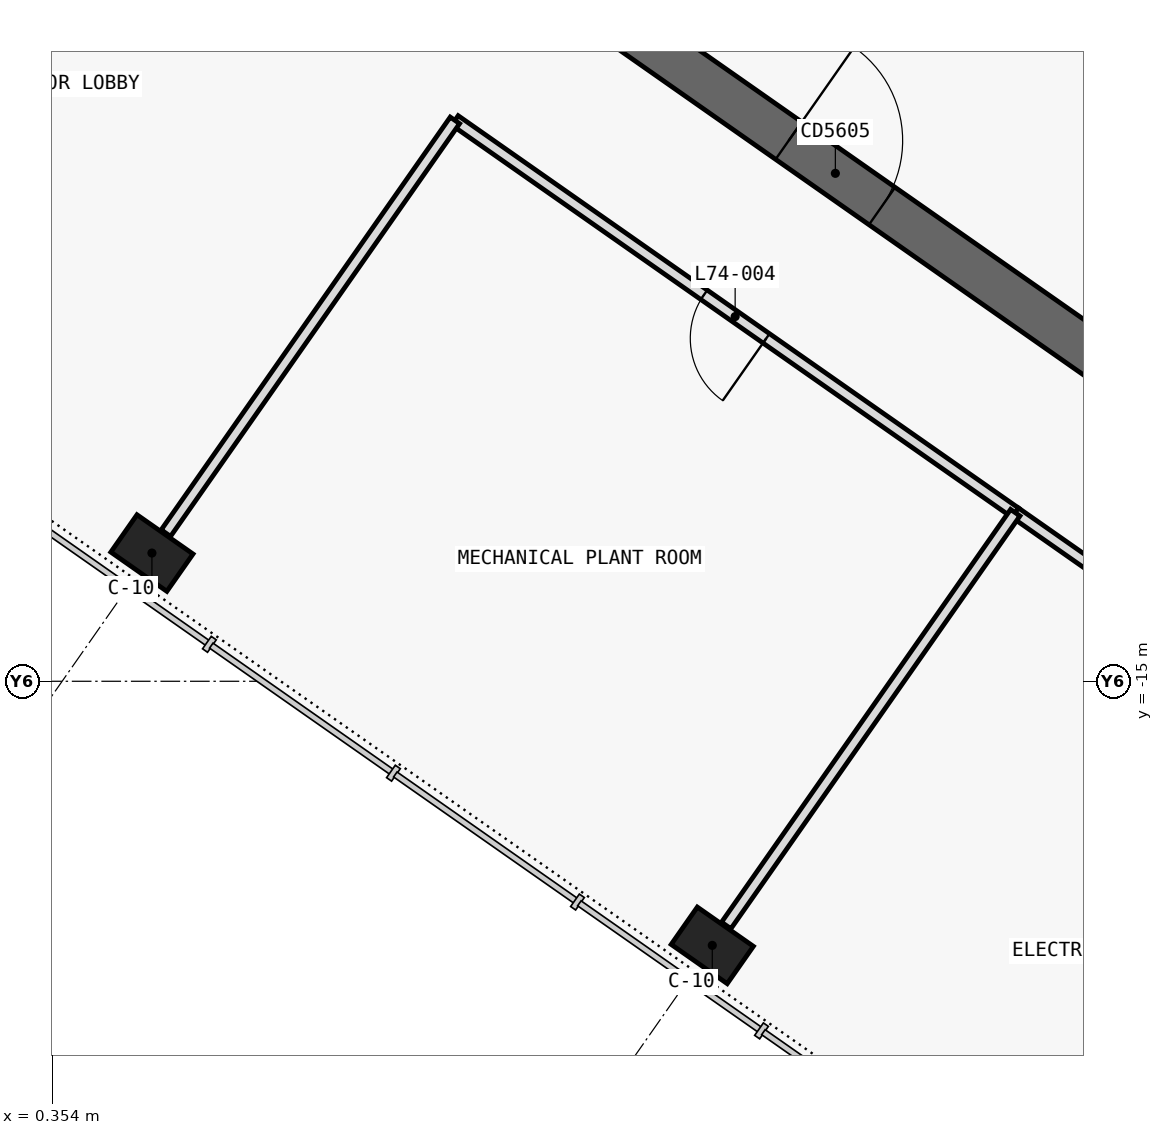
"""IFC4 building model, lengths in metres.
Left out: names, types, materials, properties, quantities, classifications, styles, units other than length and angle.
Written with IfcOpenShell. Run it as: python <this file> out.ifc"""

import sys

from ifc_helpers import new_model, si_unit, direction, frame, frame_2d, origin, origin_2d, place, context, subcontext, project, spatial, polyline, rectangle, outline, extrude, element, fill, save


model = new_model("IFC4")
c1 = context("Model", 3, precision=1e-05, world=origin(), true_north=direction((0.0, 1.0)))
c2 = subcontext(c1, "Body", "Model", "MODEL_VIEW")
j1 = project(units=[si_unit("LENGTHUNIT", "METRE"), si_unit("PLANEANGLEUNIT", "RADIAN")], contexts=[c1])
p1 = place(None, origin())
s1 = spatial("IfcSite", under=j1, at=p1, CompositionType="ELEMENT")
p2 = place(p1, origin())
s2 = spatial("IfcBuilding", under=s1, at=p2, CompositionType="ELEMENT")
p3 = place(p2, frame((0.0, 0.0, 313.3)))
s3 = spatial("IfcBuildingStorey", under=s2, at=p3, CompositionType="ELEMENT", Elevation=313.3)
p4 = place(p3, frame((0.028, 12.066, 0.0), z_axis=(0.0, 0.0, 1.0), x_axis=(0.819151382952, -0.573577380837, 0.0)))
e1 = element("IfcWall", 1, at=p4, inside=s3, PredefinedType="SHEAR", context=c2, shape_type="SweptSolid", body=[
    extrude(outline(polyline([(33.898, 0.3), (0.0, 0.3), (0.42, -0.3), (33.898, -0.3), (33.898, 0.3)])), origin(), (0.0, 0.0, 1.0), 5.5),
])
p5 = place(p3, frame((0.028, -0.874, 0.0), z_axis=(0.0, 0.0, 1.0), x_axis=(0.819150035022, -0.573579305871, 0.0)))
e2 = element("IfcWall", 2, at=p5, inside=s3, PredefinedType="SHEAR", context=c2, shape_type="SweptSolid", body=[
    extrude(outline(polyline([(26.476, 0.3), (0.0, 0.3), (0.42, -0.3), (26.476, -0.3), (26.476, 0.3)])), origin(), (0.0, 0.0, 1.0), 5.5),
])
p6 = place(p5, frame((6.576, 0.0, 0.0)))
e3 = element("IfcOpeningElement", 3, at=p6, cuts=e2, PredefinedType="OPENING", context=c2, shape_type="SweptSolid", body=[
    extrude(rectangle(XDim=1.5, YDim=2.1, at=frame_2d((0.75, 1.05))), frame((0.0, 0.31, 0.0), z_axis=(0.0, -1.0, 0.0), x_axis=(1.0, 0.0, 0.0)), (0.0, 0.0, 1.0), 0.62),
])
p7 = place(p5, frame((12.226, 0.0, 0.0)))
e4 = element("IfcOpeningElement", 4, at=p7, cuts=e2, PredefinedType="OPENING", context=c2, shape_type="SweptSolid", body=[
    extrude(rectangle(XDim=1.5, YDim=2.1, at=frame_2d((0.75, 1.05))), frame((0.0, 0.31, 0.0), z_axis=(0.0, -1.0, 0.0), x_axis=(1.0, 0.0, 0.0)), (0.0, 0.0, 1.0), 0.62),
])
p8 = place(p3, frame((2.638, 3.768, 0.0), z_axis=(0.0, 0.0, 1.0), x_axis=(0.819155014212, -0.573572194837, 0.0)))
e5 = element("IfcWall", 5, at=p8, inside=s3, PredefinedType="SHEAR", context=c2, shape_type="SweptSolid", body=[
    extrude(outline(polyline([(0.0, 0.15), (0.0, -0.15), (26.4, -0.15), (26.4, 0.15), (0.0, 0.15)])), origin(), (0.0, 0.0, 1.0), 5.5),
])
p9 = place(p8, frame((9.637, 0.0, 0.0)))
e6 = element("IfcOpeningElement", 6, at=p9, cuts=e5, PredefinedType="OPENING", context=c2, shape_type="SweptSolid", body=[
    extrude(rectangle(XDim=1.2, YDim=2.1, at=frame_2d((0.6, 1.05))), frame((0.0, 0.16, 0.0), z_axis=(0.0, -1.0, 0.0), x_axis=(1.0, 0.0, 0.0)), (0.0, 0.0, 1.0), 0.32),
])
p10 = place(p8, frame((11.812, 0.0, 0.0)))
e7 = element("IfcOpeningElement", 7, at=p10, cuts=e5, PredefinedType="OPENING", context=c2, shape_type="SweptSolid", body=[
    extrude(rectangle(XDim=1.2, YDim=2.1, at=frame_2d((0.6, 1.05))), frame((0.0, 0.16, 0.0), z_axis=(0.0, -1.0, 0.0), x_axis=(1.0, 0.0, 0.0)), (0.0, 0.0, 1.0), 0.32),
])
p11 = place(p8, frame((13.988, 0.0, 0.0)))
e8 = element("IfcOpeningElement", 8, at=p11, cuts=e5, PredefinedType="OPENING", context=c2, shape_type="SweptSolid", body=[
    extrude(rectangle(XDim=1.2, YDim=2.1, at=frame_2d((0.6, 1.05))), frame((0.0, 0.16, 0.0), z_axis=(0.0, -1.0, 0.0), x_axis=(1.0, 0.0, 0.0)), (0.0, 0.0, 1.0), 0.32),
])
p12 = place(p8, frame((16.262, 0.0, 0.0)))
e9 = element("IfcOpeningElement", 9, at=p12, cuts=e5, PredefinedType="OPENING", context=c2, shape_type="SweptSolid", body=[
    extrude(rectangle(XDim=1.0, YDim=2.1, at=frame_2d((0.5, 1.05))), frame((0.0, 0.16, 0.0), z_axis=(0.0, -1.0, 0.0), x_axis=(1.0, 0.0, 0.0)), (0.0, 0.0, 1.0), 0.32),
])
for number, where, z_axis, x_axis in (
    (10, (1.665, -13.313, 0.0), (0.0, 0.0, 1.0), (0.819, -0.574, 0.0)),
    (11, (9.038, -18.475, 0.0), (0.0, 0.0, 1.0), (0.819, -0.574, 0.0)),
):
    element("IfcColumn", number, at=place(p3, frame(where, z_axis=z_axis, x_axis=x_axis)), inside=s3, PredefinedType="COLUMN", context=c2, shape_type="SweptSolid", body=[
        extrude(rectangle(XDim=0.9, YDim=0.6, at=origin_2d()), origin(), (0.0, 0.0, 1.0), 5.5),
    ])
p13 = place(p3, frame((13.026, -12.783, 0.0), z_axis=(0.0, 0.0, 1.0), x_axis=(-0.81915291695, 0.57357519006, 0.0)))
e12 = element("IfcWall", 12, at=p13, inside=s3, PredefinedType="PARTITIONING", context=c2, shape_type="SweptSolid", body=[
    extrude(rectangle(XDim=9.002, YDim=0.15, at=frame_2d((4.501, 0.0))), origin(), (0.0, 0.0, 1.0), 5.2),
])
p14 = place(p13, frame((4.001, 0.0, 0.0)))
e13 = element("IfcOpeningElement", 13, at=p14, cuts=e12, PredefinedType="OPENING", context=c2, shape_type="SweptSolid", body=[
    extrude(rectangle(XDim=1.0, YDim=2.1, at=frame_2d((0.5, 1.05))), frame((0.0, 0.085, 0.0), z_axis=(0.0, -1.0, 0.0), x_axis=(1.0, 0.0, 0.0)), (0.0, 0.0, 1.0), 0.17),
])
p15 = place(p3, frame((20.398, -17.945, 0.0), z_axis=(0.0, 0.0, 1.0), x_axis=(-0.819142740634, 0.573589723117, 0.0)))
e14 = element("IfcWall", 14, at=p15, inside=s3, PredefinedType="PARTITIONING", context=c2, shape_type="SweptSolid", body=[
    extrude(rectangle(XDim=9.004, YDim=0.15, at=frame_2d((4.502, 0.0))), origin(), (0.0, 0.0, 1.0), 5.2),
])
p16 = place(p15, frame((4.002, 0.0, 0.0)))
e15 = element("IfcOpeningElement", 15, at=p16, cuts=e14, PredefinedType="OPENING", context=c2, shape_type="SweptSolid", body=[
    extrude(rectangle(XDim=1.0, YDim=2.1, at=frame_2d((0.5, 1.05))), frame((0.0, 0.085, 0.0), z_axis=(0.0, -1.0, 0.0), x_axis=(1.0, 0.0, 0.0)), (0.0, 0.0, 1.0), 0.17),
])
p17 = place(p3, frame((13.024, -12.782, 0.0), z_axis=(0.0, 0.0, 1.0), x_axis=(-0.573556251799, -0.819166177294, 0.0)))
e16 = element("IfcWall", 16, at=p17, inside=s3, PredefinedType="PARTITIONING", context=c2, shape_type="SweptSolid", body=[
    extrude(rectangle(XDim=6.63, YDim=0.15, at=frame_2d((3.315, 0.0))), origin(), (0.0, 0.0, 1.0), 5.2),
])
p18 = place(p3, frame((1.849, -13.051, 0.0), z_axis=(0.0, 0.0, 1.0), x_axis=(0.57357355307, 0.819154063177, 0.0)))
e17 = element("IfcWall", 17, at=p18, inside=s3, PredefinedType="PARTITIONING", context=c2, shape_type="SweptSolid", body=[
    extrude(rectangle(XDim=6.63, YDim=0.15, at=frame_2d((3.315, 0.0))), origin(), (0.0, 0.0, 1.0), 5.2),
])
p19 = place(p7, origin())
e18 = element("IfcDoor", 18, at=p19, inside=s3, OperationType="DOUBLE_DOOR_SINGLE_SWING", PredefinedType="DOOR", context=c2, shape_type="SweptSolid", body=[
    extrude(rectangle(XDim=1.5, YDim=2.1, at=frame_2d((0.75, 1.05))), frame((0.0, 0.025, 0.0), z_axis=(0.0, -1.0, 0.0), x_axis=(1.0, 0.0, 0.0)), (0.0, 0.0, 1.0), 0.05),
])
fill(e4, e18)
p20 = place(p14, origin())
e19 = element("IfcDoor", 19, at=p20, inside=s3, OperationType="SINGLE_SWING_LEFT", PredefinedType="DOOR", context=c2, shape_type="SweptSolid", body=[
    extrude(rectangle(XDim=1.0, YDim=2.1, at=frame_2d((0.5, 1.05))), frame((0.0, 0.025, 0.0), z_axis=(0.0, -1.0, 0.0), x_axis=(1.0, 0.0, 0.0)), (0.0, 0.0, 1.0), 0.05),
])
fill(e13, e19)
save(model, sys.argv[1])
